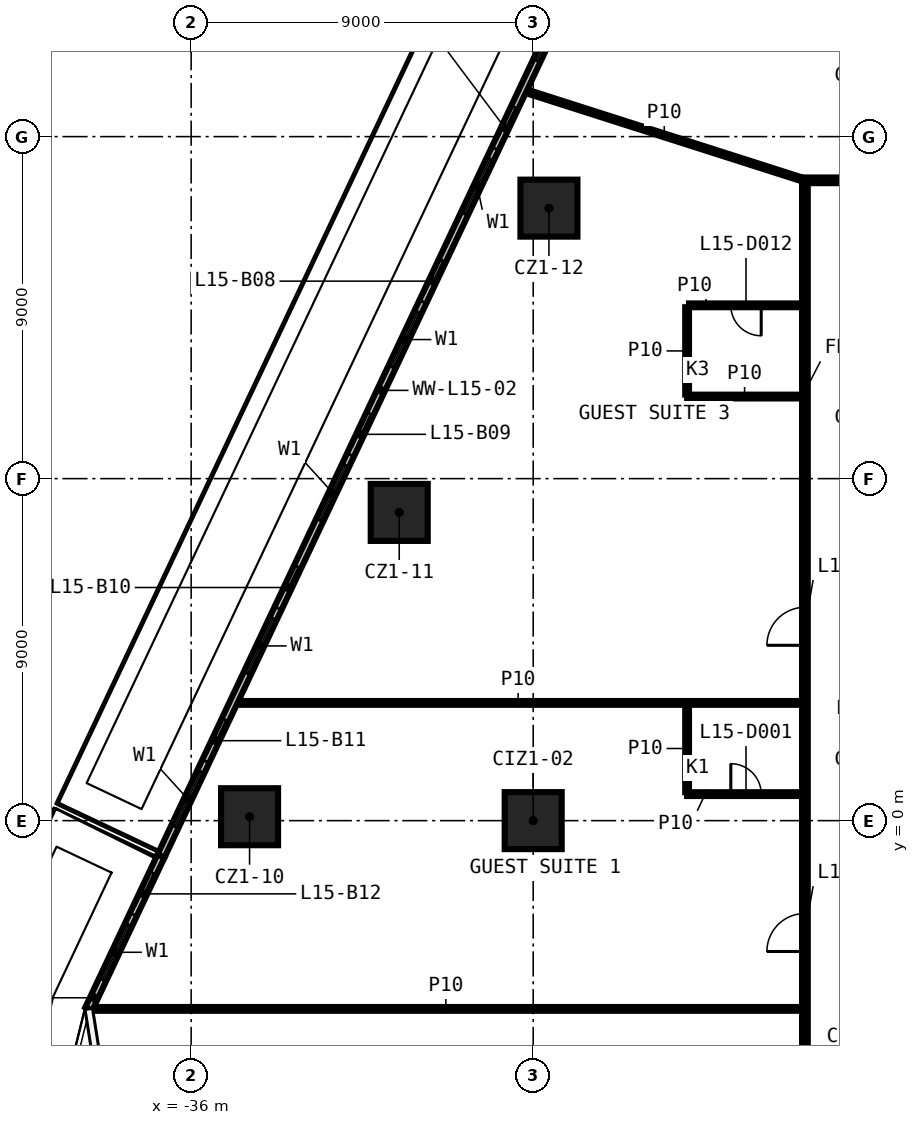
"""IFC4 building model, lengths in metres.
Left out: names, types, materials, properties, quantities, classifications, styles, units other than length and angle.
Written with IfcOpenShell. Run it as: python <this file> out.ifc"""

import sys

from ifc_helpers import new_model, si_unit, direction, frame, frame_2d, origin, origin_2d, place, context, subcontext, project, spatial, rectangle, extrude, element, fill, save


model = new_model("IFC4")
c1 = context("Model", 3, precision=1e-05, world=origin(), true_north=direction((0.0, 1.0)))
c2 = subcontext(c1, "Body", "Model", "MODEL_VIEW")
j1 = project(units=[si_unit("LENGTHUNIT", "METRE"), si_unit("PLANEANGLEUNIT", "RADIAN")], contexts=[c1])
p1 = place(None, origin())
s1 = spatial("IfcSite", under=j1, at=p1, CompositionType="ELEMENT")
p2 = place(p1, origin())
s2 = spatial("IfcBuilding", under=s1, at=p2, CompositionType="ELEMENT")
p3 = place(p2, frame((0.0, 0.0, 77.3)))
s3 = spatial("IfcBuildingStorey", under=s2, at=p3, CompositionType="ELEMENT", Elevation=77.3)
for number, where, z_axis, x_axis in (
    (1, (-34.463, 0.103, 0.0), (0.0, 0.0, 1.0), (1.0, 0.0, 0.0)),
    (2, (-30.525, 8.111, 0.0), (0.0, 0.0, 1.0), (1.0, 0.0, 0.0)),
    (3, (-26.586, 16.118, 0.0), (0.0, 0.0, 1.0), (1.0, 0.0, 0.0)),
    (4, (-27.0, 0.0, 0.0), (0.0, 0.0, 1.0), (1.0, 0.0, 0.0)),
):
    element("IfcColumn", number, at=place(p3, frame(where, z_axis=z_axis, x_axis=x_axis)), inside=s3, PredefinedType="COLUMN", context=c2, shape_type="SweptSolid", body=[
        extrude(rectangle(XDim=1.5, YDim=1.5, at=origin_2d()), origin(), (0.0, 0.0, 1.0), 3.3),
    ])
p4 = place(p3, frame((-38.672, -4.954, 0.0), z_axis=(0.0, 0.0, 1.0), x_axis=(1.0, 0.0, 0.0)))
e5 = element("IfcWall", 5, at=p4, inside=s3, PredefinedType="PARTITIONING", context=c2, shape_type="SweptSolid", body=[
    extrude(rectangle(XDim=18.747, YDim=0.1, at=frame_2d((9.374, 0.0))), origin(), (0.0, 0.0, 1.0), 3.3),
])
p5 = place(p3, frame((-22.95, 0.698, 0.0), z_axis=(0.0, 0.0, 1.0), x_axis=(1.0, 0.0, 0.0)))
e6 = element("IfcWall", 6, at=p5, inside=s3, PredefinedType="PARTITIONING", context=c2, shape_type="SweptSolid", body=[
    extrude(rectangle(XDim=3.025, YDim=0.1, at=frame_2d((1.512, 0.0))), origin(), (0.0, 0.0, 1.0), 3.3),
])
p6 = place(p5, frame((1.15, 0.0, 0.0)))
e7 = element("IfcOpeningElement", 7, at=p6, cuts=e6, PredefinedType="OPENING", context=c2, shape_type="SweptSolid", body=[
    extrude(rectangle(XDim=0.8, YDim=2.1, at=frame_2d((0.4, 1.05))), frame((0.0, 0.06, 0.0), z_axis=(0.0, -1.0, 0.0), x_axis=(1.0, 0.0, 0.0)), (0.0, 0.0, 1.0), 0.12),
])
p7 = place(p3, frame((-34.868, 3.098, 0.0), z_axis=(0.0, 0.0, 1.0), x_axis=(1.0, 0.0, 0.0)))
e8 = element("IfcWall", 8, at=p7, inside=s3, PredefinedType="PARTITIONING", context=c2, shape_type="SweptSolid", body=[
    extrude(rectangle(XDim=14.943, YDim=0.1, at=frame_2d((7.471, 0.0))), origin(), (0.0, 0.0, 1.0), 3.3),
])
p8 = place(p3, frame((-22.95, 11.16, 0.0), z_axis=(0.0, 0.0, 1.0), x_axis=(1.0, 0.0, 0.0)))
e9 = element("IfcWall", 9, at=p8, inside=s3, PredefinedType="PARTITIONING", context=c2, shape_type="SweptSolid", body=[
    extrude(rectangle(XDim=3.025, YDim=0.1, at=frame_2d((1.512, 0.0))), origin(), (0.0, 0.0, 1.0), 3.3),
])
p9 = place(p3, frame((-19.925, 13.56, 0.0), z_axis=(0.0, 0.0, 1.0), x_axis=(-1.0, 0.0, 0.0)))
e10 = element("IfcWall", 10, at=p9, inside=s3, PredefinedType="PARTITIONING", context=c2, shape_type="SweptSolid", body=[
    extrude(rectangle(XDim=2.975, YDim=0.1, at=frame_2d((1.487, 0.0))), origin(), (0.0, 0.0, 1.0), 3.3),
])
p10 = place(p9, frame((1.075, 0.0, 0.0)))
e11 = element("IfcOpeningElement", 11, at=p10, cuts=e10, PredefinedType="OPENING", context=c2, shape_type="SweptSolid", body=[
    extrude(rectangle(XDim=0.8, YDim=2.1, at=frame_2d((0.4, 1.05))), frame((0.0, 0.06, 0.0), z_axis=(0.0, -1.0, 0.0), x_axis=(1.0, 0.0, 0.0)), (0.0, 0.0, 1.0), 0.12),
])
p11 = place(p3, frame((-19.925, 16.85, 0.0), z_axis=(0.0, 0.0, 1.0), x_axis=(1.0, 0.0, 0.0)))
e12 = element("IfcWall", 12, at=p11, inside=s3, PredefinedType="PARTITIONING", context=c2, shape_type="SweptSolid", body=[
    extrude(rectangle(XDim=39.85, YDim=0.15, at=frame_2d((19.925, 0.0))), origin(), (0.0, 0.0, 1.0), 3.3),
])
p12 = place(p11, frame((31.667, 0.0, 0.0)))
e13 = element("IfcOpeningElement", 13, at=p12, cuts=e12, PredefinedType="OPENING", context=c2, shape_type="SweptSolid", body=[
    extrude(rectangle(XDim=0.9, YDim=2.1, at=frame_2d((0.45, 1.05))), frame((0.0, 0.085, 0.0), z_axis=(0.0, -1.0, 0.0), x_axis=(1.0, 0.0, 0.0)), (0.0, 0.0, 1.0), 0.17),
])
p13 = place(p11, frame((13.656, 0.0, 0.0)))
e14 = element("IfcOpeningElement", 14, at=p13, cuts=e12, PredefinedType="OPENING", context=c2, shape_type="SweptSolid", body=[
    extrude(rectangle(XDim=0.9, YDim=2.1, at=frame_2d((0.45, 1.05))), frame((0.0, 0.085, 0.0), z_axis=(0.0, -1.0, 0.0), x_axis=(1.0, 0.0, 0.0)), (0.0, 0.0, 1.0), 0.17),
])
p14 = place(p3, frame((-19.85, -16.775, 0.0), z_axis=(0.0, 0.0, 1.0), x_axis=(0.0, 1.0, 0.0)))
e15 = element("IfcWall", 15, at=p14, inside=s3, PredefinedType="PARTITIONING", context=c2, shape_type="SweptSolid", body=[
    extrude(rectangle(XDim=33.55, YDim=0.15, at=frame_2d((16.775, 0.0))), origin(), (0.0, 0.0, 1.0), 3.3),
])
p15 = place(p14, frame((13.332, 0.0, 0.0)))
e16 = element("IfcOpeningElement", 16, at=p15, cuts=e15, PredefinedType="OPENING", context=c2, shape_type="SweptSolid", body=[
    extrude(rectangle(XDim=1.0, YDim=2.1, at=frame_2d((0.5, 1.05))), frame((0.0, 0.085, 0.0), z_axis=(0.0, -1.0, 0.0), x_axis=(1.0, 0.0, 0.0)), (0.0, 0.0, 1.0), 0.17),
])
p16 = place(p14, frame((4.207, 0.0, 0.0)))
e17 = element("IfcOpeningElement", 17, at=p16, cuts=e15, PredefinedType="OPENING", context=c2, shape_type="SweptSolid", body=[
    extrude(rectangle(XDim=0.9, YDim=2.1, at=frame_2d((0.45, 1.05))), frame((0.0, 0.085, 0.0), z_axis=(0.0, -1.0, 0.0), x_axis=(1.0, 0.0, 0.0)), (0.0, 0.0, 1.0), 0.17),
])
p17 = place(p14, frame((21.389, 0.0, 0.0)))
e18 = element("IfcOpeningElement", 18, at=p17, cuts=e15, PredefinedType="OPENING", context=c2, shape_type="SweptSolid", body=[
    extrude(rectangle(XDim=1.0, YDim=2.1, at=frame_2d((0.5, 1.05))), frame((0.0, 0.085, 0.0), z_axis=(0.0, -1.0, 0.0), x_axis=(1.0, 0.0, 0.0)), (0.0, 0.0, 1.0), 0.17),
])
p18 = place(p3, frame((-22.95, 0.748, 0.0), z_axis=(0.0, 0.0, 1.0), x_axis=(0.0, 1.0, 0.0)))
e19 = element("IfcWall", 19, at=p18, inside=s3, PredefinedType="PARTITIONING", context=c2, shape_type="SweptSolid", body=[
    extrude(rectangle(XDim=2.3, YDim=0.1, at=frame_2d((1.15, 0.0))), origin(), (0.0, 0.0, 1.0), 3.3),
])
p19 = place(p3, frame((-22.95, 11.21, 0.0), z_axis=(0.0, 0.0, 1.0), x_axis=(0.0, 1.0, 0.0)))
e20 = element("IfcWall", 20, at=p19, inside=s3, PredefinedType="PARTITIONING", context=c2, shape_type="SweptSolid", body=[
    extrude(rectangle(XDim=2.3, YDim=0.1, at=frame_2d((1.15, 0.0))), origin(), (0.0, 0.0, 1.0), 3.3),
])
p20 = place(p3, frame((-27.253, 19.216, 0.0), z_axis=(0.0, 0.0, 1.0), x_axis=(0.952548805098, -0.304385896366, 0.0)))
e21 = element("IfcWall", 21, at=p20, inside=s3, PredefinedType="PARTITIONING", context=c2, shape_type="SweptSolid", body=[
    extrude(rectangle(XDim=7.772, YDim=0.1, at=frame_2d((3.886, 0.0))), origin(), (0.0, 0.0, 1.0), 3.3),
])
p21 = place(p3, frame((-25.368, 23.253, 0.0), z_axis=(0.0, 0.0, 1.0), x_axis=(-0.427150376431, -0.90418059917, 0.0)))
e22 = element("IfcWall", 22, at=p21, inside=s3, PredefinedType="SOLIDWALL", context=c2, shape_type="SweptSolid", body=[
    extrude(rectangle(XDim=26.749, YDim=0.2, at=frame_2d((13.375, 0.0))), origin(), (0.0, 0.0, 1.0), 3.3),
])
p22 = place(p21, frame((2.0, 0.0, 0.6)))
e23 = element("IfcOpeningElement", 23, at=p22, cuts=e22, PredefinedType="OPENING", context=c2, shape_type="SweptSolid", body=[
    extrude(rectangle(XDim=1.6, YDim=2.4, at=frame_2d((0.8, 1.2))), frame((0.0, 0.11, 0.0), z_axis=(0.0, -1.0, 0.0), x_axis=(1.0, 0.0, 0.0)), (0.0, 0.0, 1.0), 0.22),
])
p23 = place(p21, frame((0.5, 0.0, 0.0)))
e24 = element("IfcOpeningElement", 24, at=p23, cuts=e22, PredefinedType="OPENING", context=c2, shape_type="SweptSolid", body=[
    extrude(rectangle(XDim=1.2, YDim=2.4, at=frame_2d((0.6, 1.2))), frame((0.0, 0.11, 0.0), z_axis=(0.0, -1.0, 0.0), x_axis=(1.0, 0.0, 0.0)), (0.0, 0.0, 1.0), 0.22),
])
p24 = place(p21, frame((6.458, 0.0, 0.6)))
e25 = element("IfcOpeningElement", 25, at=p24, cuts=e22, PredefinedType="OPENING", context=c2, shape_type="SweptSolid", body=[
    extrude(rectangle(XDim=1.6, YDim=2.4, at=frame_2d((0.8, 1.2))), frame((0.0, 0.11, 0.0), z_axis=(0.0, -1.0, 0.0), x_axis=(1.0, 0.0, 0.0)), (0.0, 0.0, 1.0), 0.22),
])
p25 = place(p21, frame((4.958, 0.0, 0.0)))
e26 = element("IfcOpeningElement", 26, at=p25, cuts=e22, PredefinedType="OPENING", context=c2, shape_type="SweptSolid", body=[
    extrude(rectangle(XDim=1.2, YDim=2.4, at=frame_2d((0.6, 1.2))), frame((0.0, 0.11, 0.0), z_axis=(0.0, -1.0, 0.0), x_axis=(1.0, 0.0, 0.0)), (0.0, 0.0, 1.0), 0.22),
])
p26 = place(p21, frame((10.916, 0.0, 0.6)))
e27 = element("IfcOpeningElement", 27, at=p26, cuts=e22, PredefinedType="OPENING", context=c2, shape_type="SweptSolid", body=[
    extrude(rectangle(XDim=1.6, YDim=2.4, at=frame_2d((0.8, 1.2))), frame((0.0, 0.11, 0.0), z_axis=(0.0, -1.0, 0.0), x_axis=(1.0, 0.0, 0.0)), (0.0, 0.0, 1.0), 0.22),
])
p27 = place(p21, frame((9.416, 0.0, 0.0)))
e28 = element("IfcOpeningElement", 28, at=p27, cuts=e22, PredefinedType="OPENING", context=c2, shape_type="SweptSolid", body=[
    extrude(rectangle(XDim=1.2, YDim=2.4, at=frame_2d((0.6, 1.2))), frame((0.0, 0.11, 0.0), z_axis=(0.0, -1.0, 0.0), x_axis=(1.0, 0.0, 0.0)), (0.0, 0.0, 1.0), 0.22),
])
p28 = place(p21, frame((15.374, 0.0, 0.6)))
e29 = element("IfcOpeningElement", 29, at=p28, cuts=e22, PredefinedType="OPENING", context=c2, shape_type="SweptSolid", body=[
    extrude(rectangle(XDim=1.6, YDim=2.4, at=frame_2d((0.8, 1.2))), frame((0.0, 0.11, 0.0), z_axis=(0.0, -1.0, 0.0), x_axis=(1.0, 0.0, 0.0)), (0.0, 0.0, 1.0), 0.22),
])
p29 = place(p21, frame((13.874, 0.0, 0.0)))
e30 = element("IfcOpeningElement", 30, at=p29, cuts=e22, PredefinedType="OPENING", context=c2, shape_type="SweptSolid", body=[
    extrude(rectangle(XDim=1.2, YDim=2.4, at=frame_2d((0.6, 1.2))), frame((0.0, 0.11, 0.0), z_axis=(0.0, -1.0, 0.0), x_axis=(1.0, 0.0, 0.0)), (0.0, 0.0, 1.0), 0.22),
])
p30 = place(p21, frame((19.833, 0.0, 0.6)))
e31 = element("IfcOpeningElement", 31, at=p30, cuts=e22, PredefinedType="OPENING", context=c2, shape_type="SweptSolid", body=[
    extrude(rectangle(XDim=1.6, YDim=2.4, at=frame_2d((0.8, 1.2))), frame((0.0, 0.11, 0.0), z_axis=(0.0, -1.0, 0.0), x_axis=(1.0, 0.0, 0.0)), (0.0, 0.0, 1.0), 0.22),
])
p31 = place(p21, frame((18.333, 0.0, 0.0)))
e32 = element("IfcOpeningElement", 32, at=p31, cuts=e22, PredefinedType="OPENING", context=c2, shape_type="SweptSolid", body=[
    extrude(rectangle(XDim=1.2, YDim=2.4, at=frame_2d((0.6, 1.2))), frame((0.0, 0.11, 0.0), z_axis=(0.0, -1.0, 0.0), x_axis=(1.0, 0.0, 0.0)), (0.0, 0.0, 1.0), 0.22),
])
p32 = place(p21, frame((24.291, 0.0, 0.6)))
e33 = element("IfcOpeningElement", 33, at=p32, cuts=e22, PredefinedType="OPENING", context=c2, shape_type="SweptSolid", body=[
    extrude(rectangle(XDim=1.6, YDim=2.4, at=frame_2d((0.8, 1.2))), frame((0.0, 0.11, 0.0), z_axis=(0.0, -1.0, 0.0), x_axis=(1.0, 0.0, 0.0)), (0.0, 0.0, 1.0), 0.22),
])
p33 = place(p21, frame((22.791, 0.0, 0.0)))
e34 = element("IfcOpeningElement", 34, at=p33, cuts=e22, PredefinedType="OPENING", context=c2, shape_type="SweptSolid", body=[
    extrude(rectangle(XDim=1.2, YDim=2.4, at=frame_2d((0.6, 1.2))), frame((0.0, 0.11, 0.0), z_axis=(0.0, -1.0, 0.0), x_axis=(1.0, 0.0, 0.0)), (0.0, 0.0, 1.0), 0.22),
])
p34 = place(p3, frame((-36.794, -0.933, 0.0), z_axis=(0.0, 0.0, 1.0), x_axis=(-0.427189555154, -0.904162089433, 0.0)))
e35 = element("IfcWall", 35, at=p34, inside=s3, PredefinedType="SOLIDWALL", context=c2, shape_type="SweptSolid", body=[
    extrude(rectangle(XDim=4.448, YDim=0.2, at=frame_2d((2.224, 0.0))), origin(), (0.0, 0.0, 1.0), 3.3),
])
p35 = place(p34, frame((2.0, 0.0, 0.6)))
e36 = element("IfcOpeningElement", 36, at=p35, cuts=e35, PredefinedType="OPENING", context=c2, shape_type="SweptSolid", body=[
    extrude(rectangle(XDim=1.6, YDim=2.4, at=frame_2d((0.8, 1.2))), frame((0.0, 0.11, 0.0), z_axis=(0.0, -1.0, 0.0), x_axis=(1.0, 0.0, 0.0)), (0.0, 0.0, 1.0), 0.22),
])
p36 = place(p34, frame((0.5, 0.0, 0.0)))
e37 = element("IfcOpeningElement", 37, at=p36, cuts=e35, PredefinedType="OPENING", context=c2, shape_type="SweptSolid", body=[
    extrude(rectangle(XDim=1.2, YDim=2.4, at=frame_2d((0.6, 1.2))), frame((0.0, 0.11, 0.0), z_axis=(0.0, -1.0, 0.0), x_axis=(1.0, 0.0, 0.0)), (0.0, 0.0, 1.0), 0.22),
])
p37 = place(p6, origin())
e38 = element("IfcDoor", 38, at=p37, inside=s3, OperationType="SINGLE_SWING_LEFT", PredefinedType="DOOR", context=c2, shape_type="SweptSolid", body=[
    extrude(rectangle(XDim=0.8, YDim=2.1, at=frame_2d((0.4, 1.05))), frame((0.0, 0.025, 0.0), z_axis=(0.0, -1.0, 0.0), x_axis=(1.0, 0.0, 0.0)), (0.0, 0.0, 1.0), 0.05),
])
fill(e7, e38)
p38 = place(p15, origin())
e39 = element("IfcDoor", 39, at=p38, inside=s3, OperationType="SINGLE_SWING_RIGHT", PredefinedType="DOOR", context=c2, shape_type="SweptSolid", body=[
    extrude(rectangle(XDim=1.0, YDim=2.1, at=frame_2d((0.5, 1.05))), frame((0.0, 0.025, 0.0), z_axis=(0.0, -1.0, 0.0), x_axis=(1.0, 0.0, 0.0)), (0.0, 0.0, 1.0), 0.05),
])
fill(e16, e39)
p39 = place(p10, origin())
e40 = element("IfcDoor", 40, at=p39, inside=s3, OperationType="SINGLE_SWING_RIGHT", PredefinedType="DOOR", context=c2, shape_type="SweptSolid", body=[
    extrude(rectangle(XDim=0.8, YDim=2.1, at=frame_2d((0.4, 1.05))), frame((0.0, 0.025, 0.0), z_axis=(0.0, -1.0, 0.0), x_axis=(1.0, 0.0, 0.0)), (0.0, 0.0, 1.0), 0.05),
])
fill(e11, e40)
p40 = place(p17, origin())
e41 = element("IfcDoor", 41, at=p40, inside=s3, OperationType="SINGLE_SWING_LEFT", PredefinedType="DOOR", context=c2, shape_type="SweptSolid", body=[
    extrude(rectangle(XDim=1.0, YDim=2.1, at=frame_2d((0.5, 1.05))), frame((0.0, 0.025, 0.0), z_axis=(0.0, -1.0, 0.0), x_axis=(1.0, 0.0, 0.0)), (0.0, 0.0, 1.0), 0.05),
])
fill(e18, e41)
p41 = place(p22, origin())
e42 = element("IfcWindow", 42, at=p41, inside=s3, PartitioningType="SINGLE_PANEL", PredefinedType="WINDOW", context=c2, shape_type="SweptSolid", body=[
    extrude(rectangle(XDim=1.6, YDim=2.4, at=frame_2d((0.8, 1.2))), frame((0.0, 0.03, 0.0), z_axis=(0.0, -1.0, 0.0), x_axis=(1.0, 0.0, 0.0)), (0.0, 0.0, 1.0), 0.06),
])
fill(e23, e42)
p42 = place(p24, origin())
e43 = element("IfcWindow", 43, at=p42, inside=s3, PartitioningType="SINGLE_PANEL", PredefinedType="WINDOW", context=c2, shape_type="SweptSolid", body=[
    extrude(rectangle(XDim=1.6, YDim=2.4, at=frame_2d((0.8, 1.2))), frame((0.0, 0.03, 0.0), z_axis=(0.0, -1.0, 0.0), x_axis=(1.0, 0.0, 0.0)), (0.0, 0.0, 1.0), 0.06),
])
fill(e25, e43)
p43 = place(p25, origin())
e44 = element("IfcDoor", 44, at=p43, inside=s3, OperationType="SLIDING_TO_LEFT", PredefinedType="DOOR", context=c2, shape_type="SweptSolid", body=[
    extrude(rectangle(XDim=1.2, YDim=2.4, at=frame_2d((0.6, 1.2))), frame((0.0, 0.025, 0.0), z_axis=(0.0, -1.0, 0.0), x_axis=(1.0, 0.0, 0.0)), (0.0, 0.0, 1.0), 0.05),
])
fill(e26, e44)
p44 = place(p26, origin())
e45 = element("IfcWindow", 45, at=p44, inside=s3, PartitioningType="SINGLE_PANEL", PredefinedType="WINDOW", context=c2, shape_type="SweptSolid", body=[
    extrude(rectangle(XDim=1.6, YDim=2.4, at=frame_2d((0.8, 1.2))), frame((0.0, 0.03, 0.0), z_axis=(0.0, -1.0, 0.0), x_axis=(1.0, 0.0, 0.0)), (0.0, 0.0, 1.0), 0.06),
])
fill(e27, e45)
p45 = place(p27, origin())
e46 = element("IfcDoor", 46, at=p45, inside=s3, OperationType="SLIDING_TO_LEFT", PredefinedType="DOOR", context=c2, shape_type="SweptSolid", body=[
    extrude(rectangle(XDim=1.2, YDim=2.4, at=frame_2d((0.6, 1.2))), frame((0.0, 0.025, 0.0), z_axis=(0.0, -1.0, 0.0), x_axis=(1.0, 0.0, 0.0)), (0.0, 0.0, 1.0), 0.05),
])
fill(e28, e46)
p46 = place(p28, origin())
e47 = element("IfcWindow", 47, at=p46, inside=s3, PartitioningType="SINGLE_PANEL", PredefinedType="WINDOW", context=c2, shape_type="SweptSolid", body=[
    extrude(rectangle(XDim=1.6, YDim=2.4, at=frame_2d((0.8, 1.2))), frame((0.0, 0.03, 0.0), z_axis=(0.0, -1.0, 0.0), x_axis=(1.0, 0.0, 0.0)), (0.0, 0.0, 1.0), 0.06),
])
fill(e29, e47)
p47 = place(p29, origin())
e48 = element("IfcDoor", 48, at=p47, inside=s3, OperationType="SLIDING_TO_LEFT", PredefinedType="DOOR", context=c2, shape_type="SweptSolid", body=[
    extrude(rectangle(XDim=1.2, YDim=2.4, at=frame_2d((0.6, 1.2))), frame((0.0, 0.025, 0.0), z_axis=(0.0, -1.0, 0.0), x_axis=(1.0, 0.0, 0.0)), (0.0, 0.0, 1.0), 0.05),
])
fill(e30, e48)
p48 = place(p30, origin())
e49 = element("IfcWindow", 49, at=p48, inside=s3, PartitioningType="SINGLE_PANEL", PredefinedType="WINDOW", context=c2, shape_type="SweptSolid", body=[
    extrude(rectangle(XDim=1.6, YDim=2.4, at=frame_2d((0.8, 1.2))), frame((0.0, 0.03, 0.0), z_axis=(0.0, -1.0, 0.0), x_axis=(1.0, 0.0, 0.0)), (0.0, 0.0, 1.0), 0.06),
])
fill(e31, e49)
p49 = place(p31, origin())
e50 = element("IfcDoor", 50, at=p49, inside=s3, OperationType="SLIDING_TO_LEFT", PredefinedType="DOOR", context=c2, shape_type="SweptSolid", body=[
    extrude(rectangle(XDim=1.2, YDim=2.4, at=frame_2d((0.6, 1.2))), frame((0.0, 0.025, 0.0), z_axis=(0.0, -1.0, 0.0), x_axis=(1.0, 0.0, 0.0)), (0.0, 0.0, 1.0), 0.05),
])
fill(e32, e50)
p50 = place(p32, origin())
e51 = element("IfcWindow", 51, at=p50, inside=s3, PartitioningType="SINGLE_PANEL", PredefinedType="WINDOW", context=c2, shape_type="SweptSolid", body=[
    extrude(rectangle(XDim=1.6, YDim=2.4, at=frame_2d((0.8, 1.2))), frame((0.0, 0.03, 0.0), z_axis=(0.0, -1.0, 0.0), x_axis=(1.0, 0.0, 0.0)), (0.0, 0.0, 1.0), 0.06),
])
fill(e33, e51)
p51 = place(p33, origin())
e52 = element("IfcDoor", 52, at=p51, inside=s3, OperationType="SLIDING_TO_LEFT", PredefinedType="DOOR", context=c2, shape_type="SweptSolid", body=[
    extrude(rectangle(XDim=1.2, YDim=2.4, at=frame_2d((0.6, 1.2))), frame((0.0, 0.025, 0.0), z_axis=(0.0, -1.0, 0.0), x_axis=(1.0, 0.0, 0.0)), (0.0, 0.0, 1.0), 0.05),
])
fill(e34, e52)
p52 = place(p35, origin())
e53 = element("IfcWindow", 53, at=p52, inside=s3, PartitioningType="SINGLE_PANEL", PredefinedType="WINDOW", context=c2, shape_type="SweptSolid", body=[
    extrude(rectangle(XDim=1.6, YDim=2.4, at=frame_2d((0.8, 1.2))), frame((0.0, 0.03, 0.0), z_axis=(0.0, -1.0, 0.0), x_axis=(1.0, 0.0, 0.0)), (0.0, 0.0, 1.0), 0.06),
])
fill(e36, e53)
p53 = place(p36, origin())
e54 = element("IfcDoor", 54, at=p53, inside=s3, OperationType="SLIDING_TO_LEFT", PredefinedType="DOOR", context=c2, shape_type="SweptSolid", body=[
    extrude(rectangle(XDim=1.2, YDim=2.4, at=frame_2d((0.6, 1.2))), frame((0.0, 0.025, 0.0), z_axis=(0.0, -1.0, 0.0), x_axis=(1.0, 0.0, 0.0)), (0.0, 0.0, 1.0), 0.05),
])
fill(e37, e54)
save(model, sys.argv[1])
